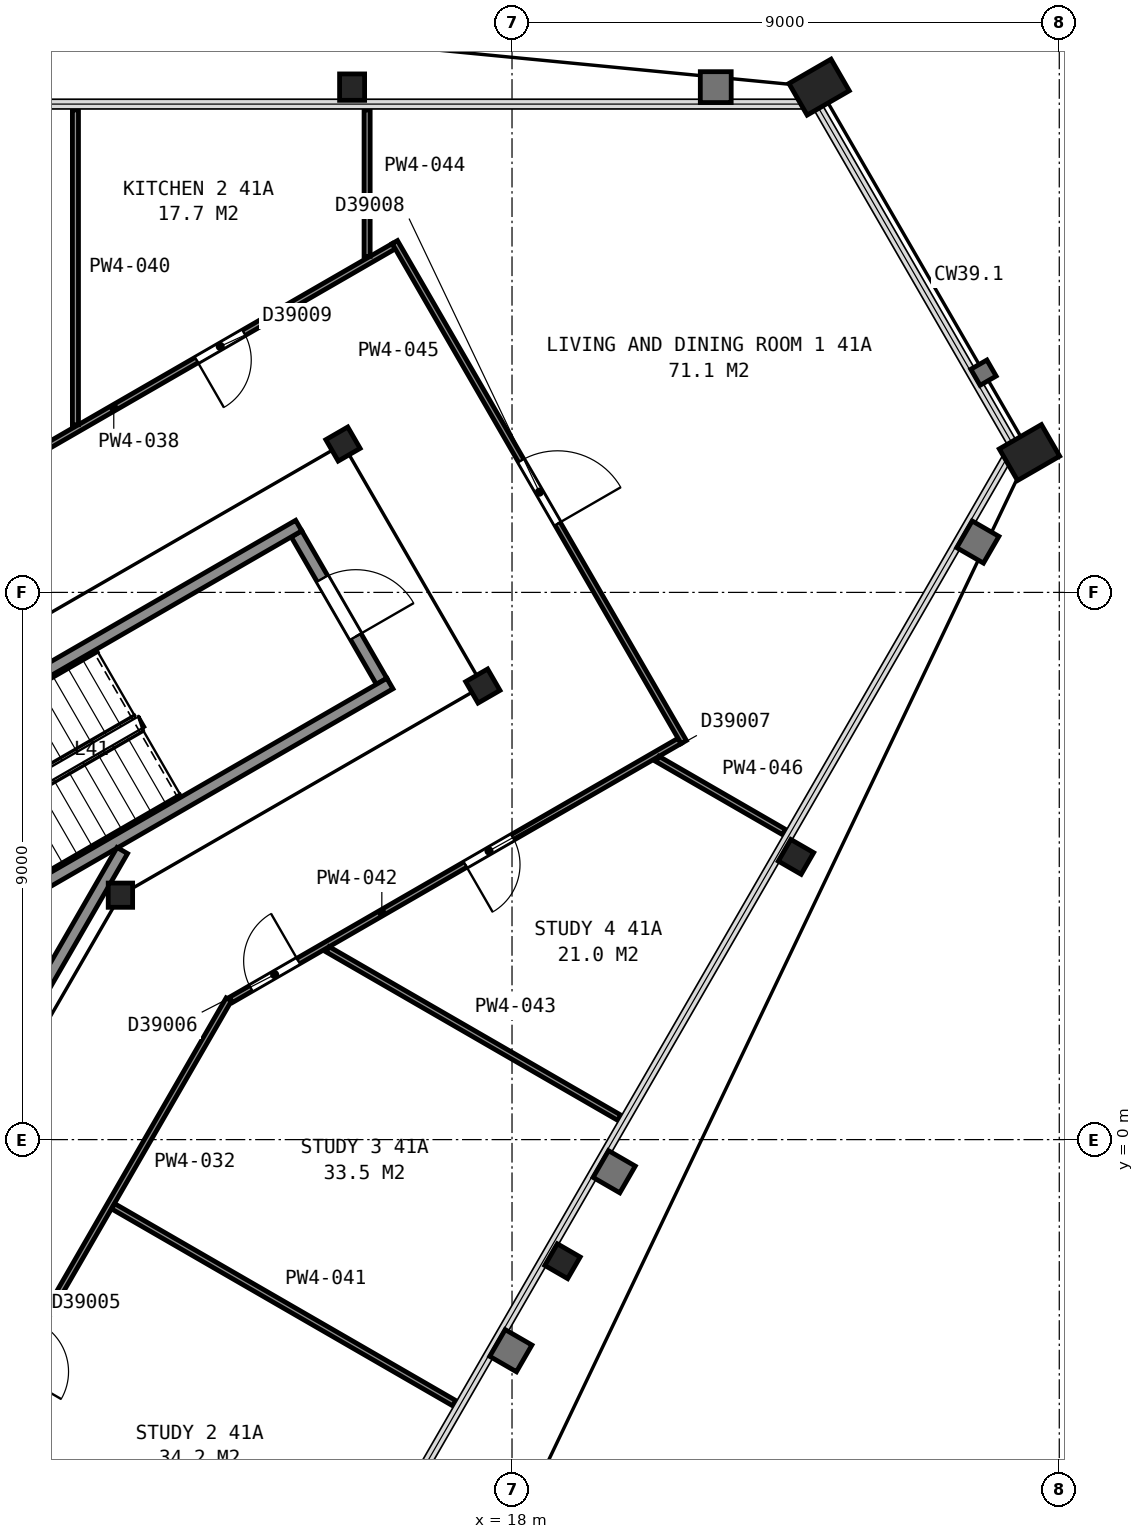
"""IFC4 building model, lengths in metres.
Left out: names, types, materials, properties, quantities, classifications, styles, units other than length and angle.
Written with IfcOpenShell. Run it as: python <this file> out.ifc"""

import sys

from ifc_helpers import new_model, si_unit, direction, frame, frame_2d, origin, origin_2d, place, context, subcontext, project, spatial, rectangle, hollow_rectangle, i_section, extrude, element, fill, save


model = new_model("IFC4")
c1 = context("Model", 3, precision=1e-05, world=origin(), true_north=direction((0.0, 1.0)))
c2 = subcontext(c1, "Body", "Model", "MODEL_VIEW")
j1 = project(units=[si_unit("LENGTHUNIT", "METRE"), si_unit("PLANEANGLEUNIT", "RADIAN")], contexts=[c1])
p1 = place(None, origin())
s1 = spatial("IfcSite", under=j1, at=p1, CompositionType="ELEMENT")
p2 = place(p1, origin())
s2 = spatial("IfcBuilding", under=s1, at=p2, CompositionType="ELEMENT")
p3 = place(p2, frame((0.0, 0.0, 167.3)))
s3 = spatial("IfcBuildingStorey", under=s2, at=p3, CompositionType="ELEMENT", Elevation=167.3)
p4 = place(p3, frame((23.05, 17.31, 0.0), z_axis=(0.0, 0.0, 1.0), x_axis=(0.5, -0.866025403784, 0.0)))
e1 = element("IfcColumn", 1, at=p4, inside=s3, PredefinedType="COLUMN", context=c2, shape_type="SweptSolid", body=[
    extrude(hollow_rectangle(XDim=0.6, YDim=0.8, WallThickness=0.05, at=origin_2d()), origin(), (0.0, 0.0, 1.0), 3.7),
])
for number, where, z_axis, x_axis in (
    (2, (15.37, 17.31, 0.0), (0.0, 0.0, 1.0), (1.0, 0.0, 0.0)),
    (3, (18.83, -2.0, 0.0), (0.0, 0.0, 1.0), (-0.5, -0.866, 0.0)),
    (4, (22.67, 4.65, 0.0), (0.0, 0.0, 1.0), (-0.5, -0.866, 0.0)),
):
    element("IfcColumn", number, at=place(p3, frame(where, z_axis=z_axis, x_axis=x_axis)), inside=s3, PredefinedType="COLUMN", context=c2, shape_type="SweptSolid", body=[
        extrude(i_section(OverallWidth=0.411, OverallDepth=0.434, WebThickness=0.036, FlangeThickness=0.057, FilletRadius=0.015, at=origin_2d()), origin(), (0.0, 0.0, 1.0), 3.7),
    ])
p5 = place(p3, frame((26.51, 11.3, 0.0), z_axis=(0.0, 0.0, 1.0), x_axis=(0.5, -0.866025403784, 0.0)))
e5 = element("IfcColumn", 5, at=p5, inside=s3, PredefinedType="COLUMN", context=c2, shape_type="SweptSolid", body=[
    extrude(hollow_rectangle(XDim=0.6, YDim=0.8, WallThickness=0.05, at=origin_2d()), origin(), (0.0, 0.0, 1.0), 3.7),
])
p6 = place(p3, frame((11.56, 4.02, 0.0), z_axis=(0.0, 0.0, 1.0), x_axis=(1.0, 0.0, 0.0)))
e6 = element("IfcColumn", 6, at=p6, inside=s3, PredefinedType="COLUMN", context=c2, shape_type="SweptSolid", body=[
    extrude(i_section(OverallWidth=0.401, OverallDepth=0.399, WebThickness=0.025, FlangeThickness=0.04, FilletRadius=0.015, at=origin_2d()), origin(), (0.0, 0.0, 1.0), 3.7),
])
for number, where, z_axis, x_axis in (
    (7, (17.52, 7.46, 0.0), (0.0, 0.0, 1.0), (0.5, -0.866, 0.0)),
    (8, (15.22, 11.44, 0.0), (0.0, 0.0, 1.0), (0.5, -0.866, 0.0)),
):
    element("IfcColumn", number, at=place(p3, frame(where, z_axis=z_axis, x_axis=x_axis)), inside=s3, PredefinedType="COLUMN", context=c2, shape_type="SweptSolid", body=[
        extrude(i_section(OverallWidth=0.406, OverallDepth=0.417, WebThickness=0.03, FlangeThickness=0.048, FilletRadius=0.015, at=origin_2d()), origin(), (0.0, 0.0, 1.0), 3.7),
    ])
p7 = place(p3, frame((15.855, 7.538, 0.0), z_axis=(0.0, 0.0, 1.0), x_axis=(-0.500049511043, 0.865996816683, 0.0)))
e9 = element("IfcWall", 9, at=p7, inside=s3, PredefinedType="PARTITIONING", context=c2, shape_type="SweptSolid", body=[
    extrude(rectangle(XDim=2.8, YDim=0.2, at=frame_2d((1.4, 0.0))), origin(), (0.0, 0.0, 1.0), 3.45),
])
p8 = place(p7, frame((0.85, 0.0, 0.0)))
e10 = element("IfcOpeningElement", 10, at=p8, cuts=e9, PredefinedType="OPENING", context=c2, shape_type="SweptSolid", body=[
    extrude(rectangle(XDim=1.1, YDim=2.1, at=frame_2d((0.55, 1.05))), frame((0.0, 0.11, 0.0), z_axis=(0.0, -1.0, 0.0), x_axis=(1.0, 0.0, 0.0)), (0.0, 0.0, 1.0), 0.22),
])
for number, where, z_axis, x_axis in (
    (11, (6.178, 5.299, 0.0), (0.0, 0.0, 1.0), (0.866, 0.5, 0.0)),
    (12, (7.678, 2.701, 0.0), (0.0, 0.0, 1.0), (0.866, 0.5, 0.0)),
):
    element("IfcWall", number, at=place(p3, frame(where, z_axis=z_axis, x_axis=x_axis)), inside=s3, PredefinedType="PARTITIONING", context=c2, shape_type="SweptSolid", body=[
        extrude(rectangle(XDim=9.6, YDim=0.2, at=frame_2d((4.8, 0.0))), origin(), (0.0, 0.0, 1.0), 3.45),
    ])
p9 = place(p3, frame((9.803, 1.658, 0.0), z_axis=(0.0, 0.0, 1.0), x_axis=(0.499943114462, 0.866058244174, 0.0)))
e13 = element("IfcWall", 13, at=p9, inside=s3, PredefinedType="PARTITIONING", context=c2, shape_type="SweptSolid", body=[
    extrude(rectangle(XDim=3.576, YDim=0.2, at=frame_2d((1.788, 0.0))), origin(), (0.0, 0.0, 1.0), 3.45),
])
p10 = place(p3, frame((13.342, 2.306, 0.0), z_axis=(0.0, 0.0, 1.0), x_axis=(-0.49997635812, -0.866039053, 0.0)))
e14 = element("IfcWall", 14, at=p10, inside=s3, PredefinedType="PARTITIONING", context=c2, shape_type="SweptSolid", body=[
    extrude(rectangle(XDim=17.285, YDim=0.1, at=frame_2d((8.643, 0.0))), origin(), (0.0, 0.0, 1.0), 2.713),
])
p11 = place(p10, frame((15.585, 0.0, 0.0)))
e15 = element("IfcOpeningElement", 15, at=p11, cuts=e14, PredefinedType="OPENING", context=c2, shape_type="SweptSolid", body=[
    extrude(rectangle(XDim=0.9, YDim=2.1, at=frame_2d((0.45, 1.05))), frame((0.0, 0.06, 0.0), z_axis=(0.0, -1.0, 0.0), x_axis=(1.0, 0.0, 0.0)), (0.0, 0.0, 1.0), 0.12),
])
p12 = place(p10, frame((11.595, 0.0, 0.0)))
e16 = element("IfcOpeningElement", 16, at=p12, cuts=e14, PredefinedType="OPENING", context=c2, shape_type="SweptSolid", body=[
    extrude(rectangle(XDim=0.9, YDim=2.1, at=frame_2d((0.45, 1.05))), frame((0.0, 0.06, 0.0), z_axis=(0.0, -1.0, 0.0), x_axis=(1.0, 0.0, 0.0)), (0.0, 0.0, 1.0), 0.12),
])
p13 = place(p10, frame((6.171, 0.0, 0.0)))
e17 = element("IfcOpeningElement", 17, at=p13, cuts=e14, PredefinedType="OPENING", context=c2, shape_type="SweptSolid", body=[
    extrude(rectangle(XDim=0.9, YDim=2.1, at=frame_2d((0.45, 1.05))), frame((0.0, 0.06, 0.0), z_axis=(0.0, -1.0, 0.0), x_axis=(1.0, 0.0, 0.0)), (0.0, 0.0, 1.0), 0.12),
])
p14 = place(p3, frame((8.691, 10.442, 0.0), z_axis=(0.0, 0.0, 1.0), x_axis=(0.866070360466, 0.499922124658, 0.0)))
e18 = element("IfcWall", 18, at=p14, inside=s3, PredefinedType="PARTITIONING", context=c2, shape_type="SweptSolid", body=[
    extrude(rectangle(XDim=8.503, YDim=0.1, at=frame_2d((4.251, 0.0))), origin(), (0.0, 0.0, 1.0), 2.713),
])
p15 = place(p14, frame((4.758, 0.0, 0.0)))
e19 = element("IfcOpeningElement", 19, at=p15, cuts=e18, PredefinedType="OPENING", context=c2, shape_type="SweptSolid", body=[
    extrude(rectangle(XDim=0.9, YDim=2.1, at=frame_2d((0.45, 1.05))), frame((0.0, 0.06, 0.0), z_axis=(0.0, -1.0, 0.0), x_axis=(1.0, 0.0, 0.0)), (0.0, 0.0, 1.0), 0.12),
])
p16 = place(p14, frame((0.715, 0.0, 0.0)))
e20 = element("IfcOpeningElement", 20, at=p16, cuts=e18, PredefinedType="OPENING", context=c2, shape_type="SweptSolid", body=[
    extrude(rectangle(XDim=0.9, YDim=2.1, at=frame_2d((0.45, 1.05))), frame((0.0, 0.06, 0.0), z_axis=(0.0, -1.0, 0.0), x_axis=(1.0, 0.0, 0.0)), (0.0, 0.0, 1.0), 0.12),
])
p17 = place(p3, frame((10.82, 11.758, 0.0), z_axis=(0.0, 0.0, 1.0), x_axis=(0.0, 1.0, 0.0)))
e21 = element("IfcWall", 21, at=p17, inside=s3, PredefinedType="PARTITIONING", context=c2, shape_type="SweptSolid", body=[
    extrude(rectangle(XDim=5.177, YDim=0.1, at=frame_2d((2.589, 0.0))), origin(), (0.0, 0.0, 1.0), 2.713),
])
p18 = place(p3, frame((11.441, -1.096, 0.0), z_axis=(0.0, 0.0, 1.0), x_axis=(0.866019919364, -0.500009499175, 0.0)))
e22 = element("IfcWall", 22, at=p18, inside=s3, PredefinedType="PARTITIONING", context=c2, shape_type="SweptSolid", body=[
    extrude(rectangle(XDim=6.479, YDim=0.1, at=frame_2d((3.239, 0.0))), origin(), (0.0, 0.0, 1.0), 2.713),
])
p19 = place(p3, frame((20.756, 6.557, 0.0), z_axis=(0.0, 0.0, 1.0), x_axis=(-0.866069146081, -0.499924228466, 0.0)))
e23 = element("IfcWall", 23, at=p19, inside=s3, PredefinedType="PARTITIONING", context=c2, shape_type="SweptSolid", body=[
    extrude(rectangle(XDim=8.519, YDim=0.1, at=frame_2d((4.259, 0.0))), origin(), (0.0, 0.0, 1.0), 2.713),
])
p20 = place(p19, frame((7.239, 0.0, 0.0)))
e24 = element("IfcOpeningElement", 24, at=p20, cuts=e23, PredefinedType="OPENING", context=c2, shape_type="SweptSolid", body=[
    extrude(rectangle(XDim=0.9, YDim=2.1, at=frame_2d((0.45, 1.05))), frame((0.0, 0.06, 0.0), z_axis=(0.0, -1.0, 0.0), x_axis=(1.0, 0.0, 0.0)), (0.0, 0.0, 1.0), 0.12),
])
p21 = place(p19, frame((3.169, 0.0, 0.0)))
e25 = element("IfcOpeningElement", 25, at=p21, cuts=e23, PredefinedType="OPENING", context=c2, shape_type="SweptSolid", body=[
    extrude(rectangle(XDim=0.9, YDim=2.1, at=frame_2d((0.45, 1.05))), frame((0.0, 0.06, 0.0), z_axis=(0.0, -1.0, 0.0), x_axis=(1.0, 0.0, 0.0)), (0.0, 0.0, 1.0), 0.12),
])
p22 = place(p3, frame((14.968, 3.13, 0.0), z_axis=(0.0, 0.0, 1.0), x_axis=(0.866001282423, -0.500041777097, 0.0)))
e26 = element("IfcWall", 26, at=p22, inside=s3, PredefinedType="PARTITIONING", context=c2, shape_type="SweptSolid", body=[
    extrude(rectangle(XDim=5.537, YDim=0.1, at=frame_2d((2.769, 0.0))), origin(), (0.0, 0.0, 1.0), 2.713),
])
p23 = place(p3, frame((15.617, 14.527, 0.0), z_axis=(0.0, 0.0, 1.0), x_axis=(0.0, 1.0, 0.0)))
e27 = element("IfcWall", 27, at=p23, inside=s3, PredefinedType="PARTITIONING", context=c2, shape_type="SweptSolid", body=[
    extrude(rectangle(XDim=2.408, YDim=0.1, at=frame_2d((1.204, 0.0))), origin(), (0.0, 0.0, 1.0), 2.713),
])
p24 = place(p3, frame((16.073, 14.761, 0.0), z_axis=(0.0, 0.0, 1.0), x_axis=(0.500297300687, -0.865853689098, 0.0)))
e28 = element("IfcWall", 28, at=p24, inside=s3, PredefinedType="PARTITIONING", context=c2, shape_type="SweptSolid", body=[
    extrude(rectangle(XDim=9.496, YDim=0.1, at=frame_2d((4.748, 0.0))), origin(), (0.0, 0.0, 1.0), 2.713),
])
p25 = place(p24, frame((4.15, 0.0, 0.0)))
e29 = element("IfcOpeningElement", 29, at=p25, cuts=e28, PredefinedType="OPENING", context=c2, shape_type="SweptSolid", body=[
    extrude(rectangle(XDim=1.2, YDim=2.1, at=frame_2d((0.6, 1.05))), frame((0.0, 0.06, 0.0), z_axis=(0.0, -1.0, 0.0), x_axis=(1.0, 0.0, 0.0)), (0.0, 0.0, 1.0), 0.12),
])
p26 = place(p3, frame((20.392, 6.261, 0.0), z_axis=(0.0, 0.0, 1.0), x_axis=(0.865953976614, -0.500123695086, 0.0)))
e30 = element("IfcWall", 30, at=p26, inside=s3, PredefinedType="PARTITIONING", context=c2, shape_type="SweptSolid", body=[
    extrude(rectangle(XDim=2.405, YDim=0.1, at=frame_2d((1.203, 0.0))), origin(), (0.0, 0.0, 1.0), 2.713),
])
p27 = place(p8, origin())
e31 = element("IfcDoor", 31, at=p27, inside=s3, OperationType="SINGLE_SWING_LEFT", PredefinedType="DOOR", context=c2, shape_type="SweptSolid", body=[
    extrude(rectangle(XDim=1.1, YDim=2.1, at=frame_2d((0.55, 1.05))), frame((0.0, 0.025, 0.0), z_axis=(0.0, -1.0, 0.0), x_axis=(1.0, 0.0, 0.0)), (0.0, 0.0, 1.0), 0.05),
])
fill(e10, e31)
p28 = place(p15, origin())
e32 = element("IfcDoor", 32, at=p28, inside=s3, OperationType="SINGLE_SWING_LEFT", PredefinedType="DOOR", context=c2, shape_type="SweptSolid", body=[
    extrude(rectangle(XDim=0.9, YDim=2.1, at=frame_2d((0.45, 1.05))), frame((0.0, 0.025, 0.0), z_axis=(0.0, -1.0, 0.0), x_axis=(1.0, 0.0, 0.0)), (0.0, 0.0, 1.0), 0.05),
])
fill(e19, e32)
p29 = place(p20, origin())
e33 = element("IfcDoor", 33, at=p29, inside=s3, OperationType="SINGLE_SWING_LEFT", PredefinedType="DOOR", context=c2, shape_type="SweptSolid", body=[
    extrude(rectangle(XDim=0.9, YDim=2.1, at=frame_2d((0.45, 1.05))), frame((0.0, 0.025, 0.0), z_axis=(0.0, -1.0, 0.0), x_axis=(1.0, 0.0, 0.0)), (0.0, 0.0, 1.0), 0.05),
])
fill(e24, e33)
p30 = place(p21, origin())
e34 = element("IfcDoor", 34, at=p30, inside=s3, OperationType="SINGLE_SWING_RIGHT", PredefinedType="DOOR", context=c2, shape_type="SweptSolid", body=[
    extrude(rectangle(XDim=0.9, YDim=2.1, at=frame_2d((0.45, 1.05))), frame((0.0, 0.025, 0.0), z_axis=(0.0, -1.0, 0.0), x_axis=(1.0, 0.0, 0.0)), (0.0, 0.0, 1.0), 0.05),
])
fill(e25, e34)
p31 = place(p25, origin())
e35 = element("IfcDoor", 35, at=p31, inside=s3, OperationType="SINGLE_SWING_RIGHT", PredefinedType="DOOR", context=c2, shape_type="SweptSolid", body=[
    extrude(rectangle(XDim=1.2, YDim=2.1, at=frame_2d((0.6, 1.05))), frame((0.0, 0.025, 0.0), z_axis=(0.0, -1.0, 0.0), x_axis=(1.0, 0.0, 0.0)), (0.0, 0.0, 1.0), 0.05),
])
fill(e29, e35)
save(model, sys.argv[1])
